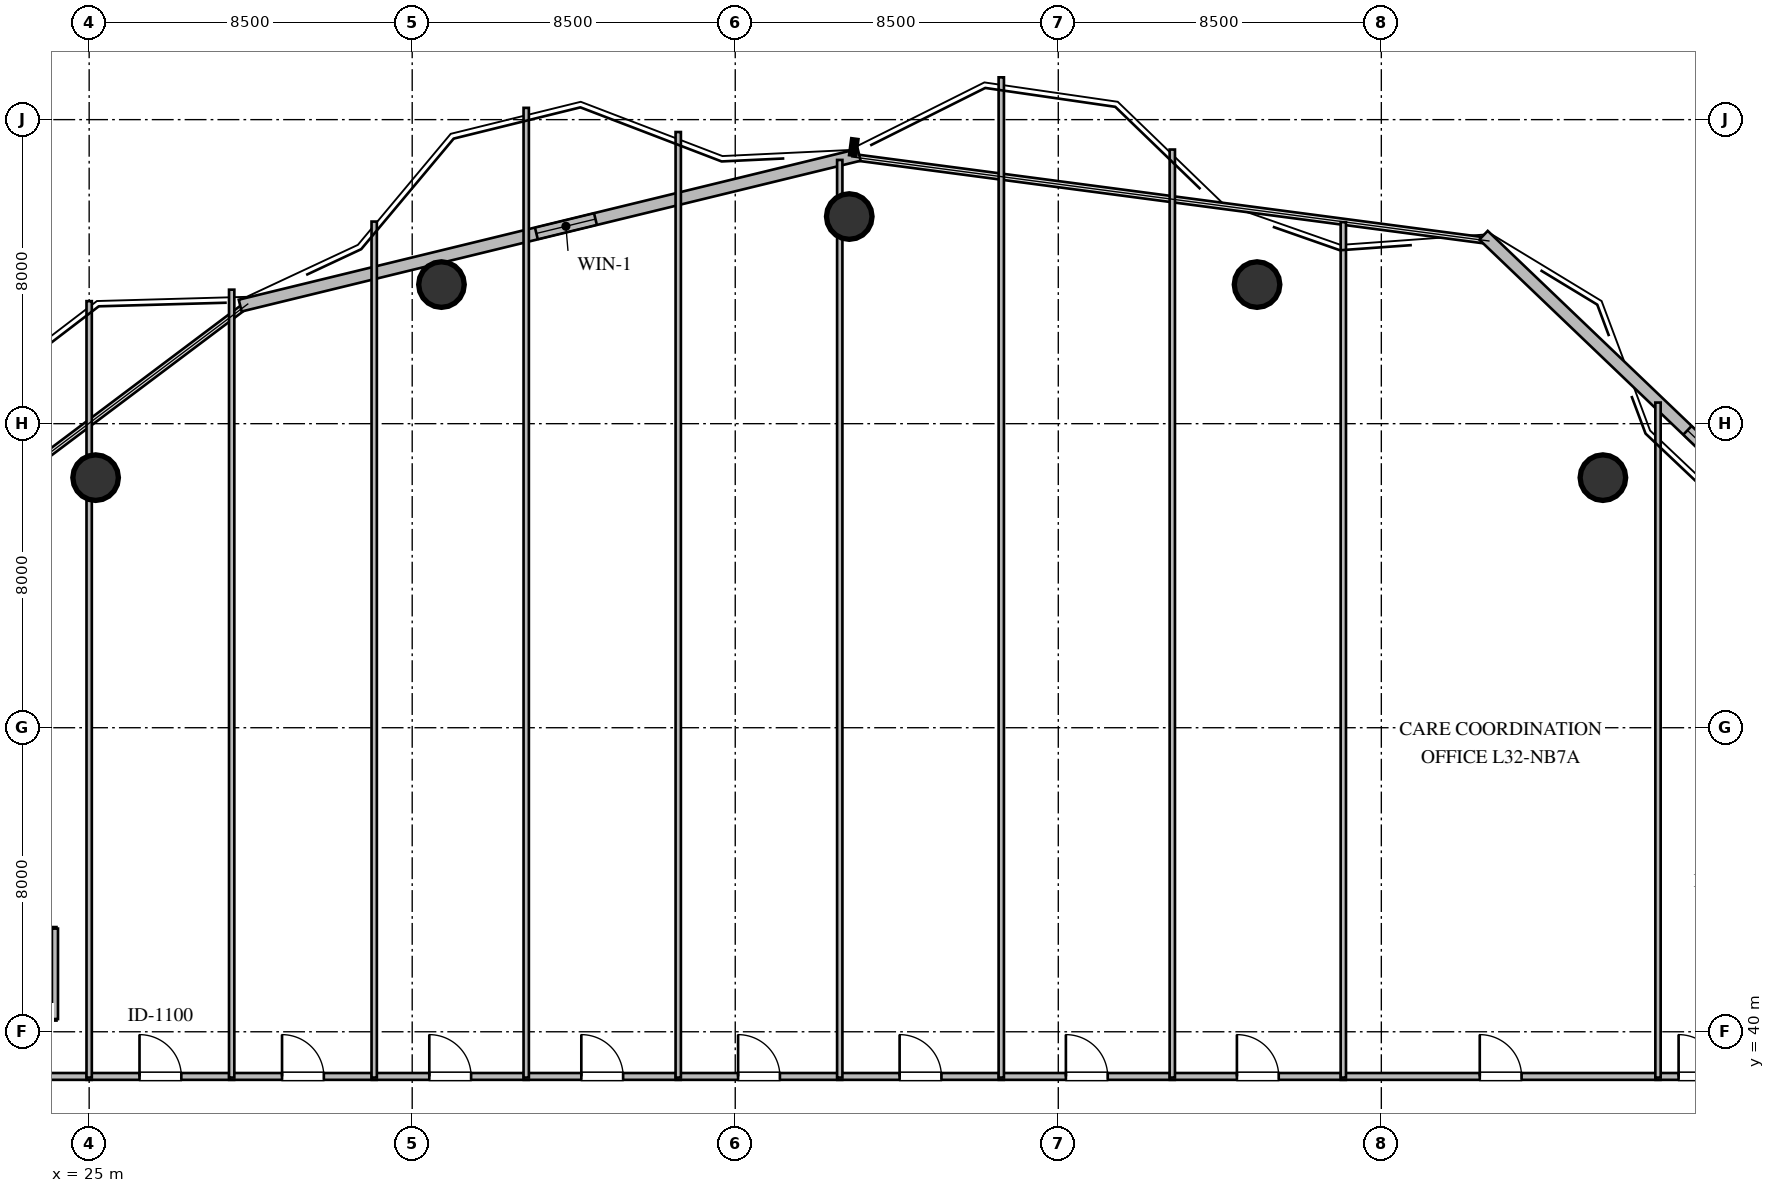
"""IFC4 building model, lengths in metres.
Left out: names, types, materials, properties, quantities, classifications, styles, units other than length and angle.
Written with IfcOpenShell. Run it as: python <this file> out.ifc"""

import sys

from ifc_helpers import new_model, si_unit, direction, frame, frame_2d, origin, origin_2d, place, context, subcontext, project, spatial, rectangle, circle, extrude, element, fill, save


model = new_model("IFC4")
c1 = context("Model", 3, precision=1e-05, world=origin(), true_north=direction((0.0, 1.0)))
c2 = subcontext(c1, "Body", "Model", "MODEL_VIEW")
j1 = project(units=[si_unit("LENGTHUNIT", "METRE"), si_unit("PLANEANGLEUNIT", "RADIAN")], contexts=[c1])
p1 = place(None, origin())
s1 = spatial("IfcSite", under=j1, at=p1, CompositionType="ELEMENT")
p2 = place(p1, origin())
s2 = spatial("IfcBuilding", under=s1, at=p2, CompositionType="ELEMENT")
p3 = place(p2, frame((0.0, 0.0, 124.2)))
s3 = spatial("IfcBuildingStorey", under=s2, at=p3, CompositionType="ELEMENT", Elevation=124.2)
for number, where, z_axis, x_axis in (
    (1, (64.83, 54.58, 0.0), (0.0, 0.0, 1.0), (1.0, 0.0, 0.0)),
    (2, (55.73, 59.66, 0.0), (0.0, 0.0, 1.0), (1.0, 0.0, 0.0)),
    (3, (45.0, 61.45, 0.0), (0.0, 0.0, 1.0), (1.0, 0.0, 0.0)),
    (4, (34.27, 59.66, 0.0), (0.0, 0.0, 1.0), (1.0, 0.0, 0.0)),
    (5, (25.17, 54.58, 0.0), (0.0, 0.0, 1.0), (1.0, 0.0, 0.0)),
):
    element("IfcColumn", number, at=place(p3, frame(where, z_axis=z_axis, x_axis=x_axis)), inside=s3, PredefinedType="COLUMN", context=c2, shape_type="SweptSolid", body=[
        extrude(circle(Radius=0.6, at=origin_2d()), origin(), (0.0, 0.0, 1.0), 3.6),
    ])
p4 = place(p3, frame((28.974, 59.107, 0.0), z_axis=(0.0, 0.0, 1.0), x_axis=(0.971593971582, 0.236654081699, 0.0)))
e6 = element("IfcWall", 6, at=p4, inside=s3, PredefinedType="STANDARD", context=c2, shape_type="SweptSolid", body=[
    extrude(rectangle(XDim=16.763, YDim=0.32, at=frame_2d((8.381, 0.0))), origin(), (0.0, 0.0, 1.0), 3.36),
])
p5 = place(p4, frame((8.021, 0.0, 1.05)))
e7 = element("IfcOpeningElement", 7, at=p5, cuts=e6, PredefinedType="OPENING", context=c2, shape_type="SweptSolid", body=[
    extrude(rectangle(XDim=1.6, YDim=1.5, at=frame_2d((0.8, 0.75))), frame((0.0, 0.17, 0.0), z_axis=(0.0, -1.0, 0.0), x_axis=(1.0, 0.0, 0.0)), (0.0, 0.0, 1.0), 0.34),
])
p6 = place(p3, frame((61.689, 60.957, 0.0), z_axis=(0.0, 0.0, 1.0), x_axis=(0.722641212534, -0.691223319881, 0.0)))
e8 = element("IfcWall", 8, at=p6, inside=s3, PredefinedType="STANDARD", context=c2, shape_type="SweptSolid", body=[
    extrude(rectangle(XDim=16.451, YDim=0.32, at=frame_2d((8.225, 0.0))), origin(), (0.0, 0.0, 1.0), 3.36),
])
p7 = place(p6, frame((7.425, 0.0, 1.05)))
e9 = element("IfcOpeningElement", 9, at=p7, cuts=e8, PredefinedType="OPENING", context=c2, shape_type="SweptSolid", body=[
    extrude(rectangle(XDim=1.6, YDim=1.5, at=frame_2d((0.8, 0.75))), frame((0.0, 0.17, 0.0), z_axis=(0.0, -1.0, 0.0), x_axis=(1.0, 0.0, 0.0)), (0.0, 0.0, 1.0), 0.34),
])
p8 = place(p3, frame((21.76, 40.375, 0.0), z_axis=(0.0, 0.0, 1.0), x_axis=(1.0, 0.0, 0.0)))
e10 = element("IfcWall", 10, at=p8, inside=s3, PredefinedType="PLUMBINGWALL", context=c2, shape_type="SweptSolid", body=[
    extrude(rectangle(XDim=2.38, YDim=0.16, at=frame_2d((1.19, 0.0))), origin(), (0.0, 0.0, 1.0), 3.36),
])
p9 = place(p3, frame((21.76, 42.675, 0.0), z_axis=(0.0, 0.0, 1.0), x_axis=(1.0, 0.0, 0.0)))
e11 = element("IfcWall", 11, at=p9, inside=s3, PredefinedType="PLUMBINGWALL", context=c2, shape_type="SweptSolid", body=[
    extrude(rectangle(XDim=2.38, YDim=0.16, at=frame_2d((1.19, 0.0))), origin(), (0.0, 0.0, 1.0), 3.36),
])
p10 = place(p9, frame((0.74, 0.0, 0.0)))
e12 = element("IfcOpeningElement", 12, at=p10, cuts=e11, PredefinedType="OPENING", context=c2, shape_type="SweptSolid", body=[
    extrude(rectangle(XDim=0.92, YDim=2.1, at=frame_2d((0.46, 1.05))), frame((0.0, 0.09, 0.0), z_axis=(0.0, -1.0, 0.0), x_axis=(1.0, 0.0, 0.0)), (0.0, 0.0, 1.0), 0.18),
])
p11 = place(p3, frame((24.1, 40.335, 0.0), z_axis=(0.0, 0.0, 1.0), x_axis=(0.0, 1.0, 0.0)))
e13 = element("IfcWall", 13, at=p11, inside=s3, PredefinedType="PLUMBINGWALL", context=c2, shape_type="SweptSolid", body=[
    extrude(rectangle(XDim=2.38, YDim=0.16, at=frame_2d((1.19, 0.0))), origin(), (0.0, 0.0, 1.0), 3.36),
])
p12 = place(p3, frame((21.185, 38.825, 0.0), z_axis=(0.0, 0.0, 1.0), x_axis=(1.0, 0.0, 0.0)))
e14 = element("IfcWall", 14, at=p12, inside=s3, PredefinedType="PARTITIONING", context=c2, shape_type="SweptSolid", body=[
    extrude(rectangle(XDim=3.88, YDim=0.18, at=frame_2d((1.94, 0.0))), origin(), (0.0, 0.0, 1.0), 3.36),
])
p13 = place(p12, frame((1.39, 0.0, 0.0)))
e15 = element("IfcOpeningElement", 15, at=p13, cuts=e14, PredefinedType="OPENING", context=c2, shape_type="SweptSolid", body=[
    extrude(rectangle(XDim=1.1, YDim=2.1, at=frame_2d((0.55, 1.05))), frame((0.0, 0.1, 0.0), z_axis=(0.0, -1.0, 0.0), x_axis=(1.0, 0.0, 0.0)), (0.0, 0.0, 1.0), 0.2),
])
p14 = place(p3, frame((24.935, 38.825, 0.0), z_axis=(0.0, 0.0, 1.0), x_axis=(1.0, 0.0, 0.0)))
e16 = element("IfcWall", 16, at=p14, inside=s3, PredefinedType="PARTITIONING", context=c2, shape_type="SweptSolid", body=[
    extrude(rectangle(XDim=3.88, YDim=0.18, at=frame_2d((1.94, 0.0))), origin(), (0.0, 0.0, 1.0), 3.36),
])
p15 = place(p14, frame((1.39, 0.0, 0.0)))
e17 = element("IfcOpeningElement", 17, at=p15, cuts=e16, PredefinedType="OPENING", context=c2, shape_type="SweptSolid", body=[
    extrude(rectangle(XDim=1.1, YDim=2.1, at=frame_2d((0.55, 1.05))), frame((0.0, 0.1, 0.0), z_axis=(0.0, -1.0, 0.0), x_axis=(1.0, 0.0, 0.0)), (0.0, 0.0, 1.0), 0.2),
])
p16 = place(p3, frame((28.685, 38.825, 0.0), z_axis=(0.0, 0.0, 1.0), x_axis=(1.0, 0.0, 0.0)))
e18 = element("IfcWall", 18, at=p16, inside=s3, PredefinedType="PARTITIONING", context=c2, shape_type="SweptSolid", body=[
    extrude(rectangle(XDim=3.88, YDim=0.18, at=frame_2d((1.94, 0.0))), origin(), (0.0, 0.0, 1.0), 3.36),
])
p17 = place(p16, frame((1.39, 0.0, 0.0)))
e19 = element("IfcOpeningElement", 19, at=p17, cuts=e18, PredefinedType="OPENING", context=c2, shape_type="SweptSolid", body=[
    extrude(rectangle(XDim=1.1, YDim=2.1, at=frame_2d((0.55, 1.05))), frame((0.0, 0.1, 0.0), z_axis=(0.0, -1.0, 0.0), x_axis=(1.0, 0.0, 0.0)), (0.0, 0.0, 1.0), 0.2),
])
p18 = place(p3, frame((32.435, 38.825, 0.0), z_axis=(0.0, 0.0, 1.0), x_axis=(1.0, 0.0, 0.0)))
e20 = element("IfcWall", 20, at=p18, inside=s3, PredefinedType="PARTITIONING", context=c2, shape_type="SweptSolid", body=[
    extrude(rectangle(XDim=4.13, YDim=0.18, at=frame_2d((2.065, 0.0))), origin(), (0.0, 0.0, 1.0), 3.36),
])
p19 = place(p18, frame((1.515, 0.0, 0.0)))
e21 = element("IfcOpeningElement", 21, at=p19, cuts=e20, PredefinedType="OPENING", context=c2, shape_type="SweptSolid", body=[
    extrude(rectangle(XDim=1.1, YDim=2.1, at=frame_2d((0.55, 1.05))), frame((0.0, 0.1, 0.0), z_axis=(0.0, -1.0, 0.0), x_axis=(1.0, 0.0, 0.0)), (0.0, 0.0, 1.0), 0.2),
])
p20 = place(p3, frame((36.435, 38.825, 0.0), z_axis=(0.0, 0.0, 1.0), x_axis=(1.0, 0.0, 0.0)))
e22 = element("IfcWall", 22, at=p20, inside=s3, PredefinedType="PARTITIONING", context=c2, shape_type="SweptSolid", body=[
    extrude(rectangle(XDim=4.13, YDim=0.18, at=frame_2d((2.065, 0.0))), origin(), (0.0, 0.0, 1.0), 3.36),
])
p21 = place(p20, frame((1.515, 0.0, 0.0)))
e23 = element("IfcOpeningElement", 23, at=p21, cuts=e22, PredefinedType="OPENING", context=c2, shape_type="SweptSolid", body=[
    extrude(rectangle(XDim=1.1, YDim=2.1, at=frame_2d((0.55, 1.05))), frame((0.0, 0.1, 0.0), z_axis=(0.0, -1.0, 0.0), x_axis=(1.0, 0.0, 0.0)), (0.0, 0.0, 1.0), 0.2),
])
p22 = place(p3, frame((40.435, 38.825, 0.0), z_axis=(0.0, 0.0, 1.0), x_axis=(1.0, 0.0, 0.0)))
e24 = element("IfcWall", 24, at=p22, inside=s3, PredefinedType="PARTITIONING", context=c2, shape_type="SweptSolid", body=[
    extrude(rectangle(XDim=4.38, YDim=0.18, at=frame_2d((2.19, 0.0))), origin(), (0.0, 0.0, 1.0), 3.36),
])
p23 = place(p22, frame((1.64, 0.0, 0.0)))
e25 = element("IfcOpeningElement", 25, at=p23, cuts=e24, PredefinedType="OPENING", context=c2, shape_type="SweptSolid", body=[
    extrude(rectangle(XDim=1.1, YDim=2.1, at=frame_2d((0.55, 1.05))), frame((0.0, 0.1, 0.0), z_axis=(0.0, -1.0, 0.0), x_axis=(1.0, 0.0, 0.0)), (0.0, 0.0, 1.0), 0.2),
])
p24 = place(p3, frame((44.685, 38.825, 0.0), z_axis=(0.0, 0.0, 1.0), x_axis=(1.0, 0.0, 0.0)))
e26 = element("IfcWall", 26, at=p24, inside=s3, PredefinedType="PARTITIONING", context=c2, shape_type="SweptSolid", body=[
    extrude(rectangle(XDim=4.38, YDim=0.18, at=frame_2d((2.19, 0.0))), origin(), (0.0, 0.0, 1.0), 3.36),
])
p25 = place(p24, frame((1.64, 0.0, 0.0)))
e27 = element("IfcOpeningElement", 27, at=p25, cuts=e26, PredefinedType="OPENING", context=c2, shape_type="SweptSolid", body=[
    extrude(rectangle(XDim=1.1, YDim=2.1, at=frame_2d((0.55, 1.05))), frame((0.0, 0.1, 0.0), z_axis=(0.0, -1.0, 0.0), x_axis=(1.0, 0.0, 0.0)), (0.0, 0.0, 1.0), 0.2),
])
p26 = place(p3, frame((48.935, 38.825, 0.0), z_axis=(0.0, 0.0, 1.0), x_axis=(1.0, 0.0, 0.0)))
e28 = element("IfcWall", 28, at=p26, inside=s3, PredefinedType="PARTITIONING", context=c2, shape_type="SweptSolid", body=[
    extrude(rectangle(XDim=4.63, YDim=0.18, at=frame_2d((2.315, 0.0))), origin(), (0.0, 0.0, 1.0), 3.36),
])
p27 = place(p26, frame((1.765, 0.0, 0.0)))
e29 = element("IfcOpeningElement", 29, at=p27, cuts=e28, PredefinedType="OPENING", context=c2, shape_type="SweptSolid", body=[
    extrude(rectangle(XDim=1.1, YDim=2.1, at=frame_2d((0.55, 1.05))), frame((0.0, 0.1, 0.0), z_axis=(0.0, -1.0, 0.0), x_axis=(1.0, 0.0, 0.0)), (0.0, 0.0, 1.0), 0.2),
])
p28 = place(p3, frame((53.435, 38.825, 0.0), z_axis=(0.0, 0.0, 1.0), x_axis=(1.0, 0.0, 0.0)))
e30 = element("IfcWall", 30, at=p28, inside=s3, PredefinedType="PARTITIONING", context=c2, shape_type="SweptSolid", body=[
    extrude(rectangle(XDim=4.63, YDim=0.18, at=frame_2d((2.315, 0.0))), origin(), (0.0, 0.0, 1.0), 3.36),
])
p29 = place(p28, frame((1.765, 0.0, 0.0)))
e31 = element("IfcOpeningElement", 31, at=p29, cuts=e30, PredefinedType="OPENING", context=c2, shape_type="SweptSolid", body=[
    extrude(rectangle(XDim=1.1, YDim=2.1, at=frame_2d((0.55, 1.05))), frame((0.0, 0.1, 0.0), z_axis=(0.0, -1.0, 0.0), x_axis=(1.0, 0.0, 0.0)), (0.0, 0.0, 1.0), 0.2),
])
p30 = place(p3, frame((57.935, 38.825, 0.0), z_axis=(0.0, 0.0, 1.0), x_axis=(1.0, 0.0, 0.0)))
e32 = element("IfcWall", 32, at=p30, inside=s3, PredefinedType="PARTITIONING", context=c2, shape_type="SweptSolid", body=[
    extrude(rectangle(XDim=8.41, YDim=0.18, at=frame_2d((4.205, 0.0))), origin(), (0.0, 0.0, 1.0), 3.36),
])
p31 = place(p30, frame((3.655, 0.0, 0.0)))
e33 = element("IfcOpeningElement", 33, at=p31, cuts=e32, PredefinedType="OPENING", context=c2, shape_type="SweptSolid", body=[
    extrude(rectangle(XDim=1.1, YDim=2.1, at=frame_2d((0.55, 1.05))), frame((0.0, 0.1, 0.0), z_axis=(0.0, -1.0, 0.0), x_axis=(1.0, 0.0, 0.0)), (0.0, 0.0, 1.0), 0.2),
])
p32 = place(p3, frame((66.215, 38.825, 0.0), z_axis=(0.0, 0.0, 1.0), x_axis=(1.0, 0.0, 0.0)))
e34 = element("IfcWall", 34, at=p32, inside=s3, PredefinedType="PARTITIONING", context=c2, shape_type="SweptSolid", body=[
    extrude(rectangle(XDim=2.315, YDim=0.18, at=frame_2d((1.157, 0.0))), origin(), (0.0, 0.0, 1.0), 3.36),
])
p33 = place(p32, frame((0.607, 0.0, 0.0)))
e35 = element("IfcOpeningElement", 35, at=p33, cuts=e34, PredefinedType="OPENING", context=c2, shape_type="SweptSolid", body=[
    extrude(rectangle(XDim=1.1, YDim=2.1, at=frame_2d((0.55, 1.05))), frame((0.0, 0.1, 0.0), z_axis=(0.0, -1.0, 0.0), x_axis=(1.0, 0.0, 0.0)), (0.0, 0.0, 1.0), 0.2),
])
p34 = place(p3, frame((25.0, 59.224, 0.0), z_axis=(0.0, 0.0, 1.0), x_axis=(0.0, -1.0, 0.0)))
e36 = element("IfcWall", 36, at=p34, inside=s3, PredefinedType="PARTITIONING", context=c2, shape_type="SweptSolid", body=[
    extrude(rectangle(XDim=20.429, YDim=0.14, at=frame_2d((10.215, 0.0))), origin(), (0.0, 0.0, 1.0), 2.806),
])
p35 = place(p3, frame((28.75, 59.526, 0.0), z_axis=(0.0, 0.0, 1.0), x_axis=(0.0, -1.0, 0.0)))
e37 = element("IfcWall", 37, at=p35, inside=s3, PredefinedType="PARTITIONING", context=c2, shape_type="SweptSolid", body=[
    extrude(rectangle(XDim=20.731, YDim=0.14, at=frame_2d((10.365, 0.0))), origin(), (0.0, 0.0, 1.0), 3.36),
])
p36 = place(p3, frame((32.5, 61.318, 0.0), z_axis=(0.0, 0.0, 1.0), x_axis=(0.0, -1.0, 0.0)))
e38 = element("IfcWall", 38, at=p36, inside=s3, PredefinedType="PARTITIONING", context=c2, shape_type="SweptSolid", body=[
    extrude(rectangle(XDim=22.523, YDim=0.14, at=frame_2d((11.262, 0.0))), origin(), (0.0, 0.0, 1.0), 3.36),
])
p37 = place(p3, frame((36.5, 64.31, 0.0), z_axis=(0.0, 0.0, 1.0), x_axis=(0.0, -1.0, 0.0)))
e39 = element("IfcWall", 39, at=p37, inside=s3, PredefinedType="PARTITIONING", context=c2, shape_type="SweptSolid", body=[
    extrude(rectangle(XDim=25.515, YDim=0.14, at=frame_2d((12.758, 0.0))), origin(), (0.0, 0.0, 1.0), 3.36),
])
p38 = place(p3, frame((40.5, 63.674, 0.0), z_axis=(0.0, 0.0, 1.0), x_axis=(0.0, -1.0, 0.0)))
e40 = element("IfcWall", 40, at=p38, inside=s3, PredefinedType="PARTITIONING", context=c2, shape_type="SweptSolid", body=[
    extrude(rectangle(XDim=24.879, YDim=0.14, at=frame_2d((12.439, 0.0))), origin(), (0.0, 0.0, 1.0), 3.36),
])
p39 = place(p3, frame((44.75, 62.939, 0.0), z_axis=(0.0, 0.0, 1.0), x_axis=(0.0, -1.0, 0.0)))
e41 = element("IfcWall", 41, at=p39, inside=s3, PredefinedType="PARTITIONING", context=c2, shape_type="SweptSolid", body=[
    extrude(rectangle(XDim=24.145, YDim=0.14, at=frame_2d((12.072, 0.0))), origin(), (0.0, 0.0, 1.0), 2.806),
])
p40 = place(p3, frame((49.0, 65.113, 0.0), z_axis=(0.0, 0.0, 1.0), x_axis=(0.0, -1.0, 0.0)))
e42 = element("IfcWall", 42, at=p40, inside=s3, PredefinedType="PARTITIONING", context=c2, shape_type="SweptSolid", body=[
    extrude(rectangle(XDim=26.318, YDim=0.14, at=frame_2d((13.159, 0.0))), origin(), (0.0, 0.0, 1.0), 3.36),
])
p41 = place(p3, frame((53.5, 63.213, 0.0), z_axis=(0.0, 0.0, 1.0), x_axis=(0.0, -1.0, 0.0)))
e43 = element("IfcWall", 43, at=p41, inside=s3, PredefinedType="PARTITIONING", context=c2, shape_type="SweptSolid", body=[
    extrude(rectangle(XDim=24.418, YDim=0.14, at=frame_2d((12.209, 0.0))), origin(), (0.0, 0.0, 1.0), 3.36),
])
p42 = place(p3, frame((58.0, 61.303, 0.0), z_axis=(0.0, 0.0, 1.0), x_axis=(0.0, -1.0, 0.0)))
e44 = element("IfcWall", 44, at=p42, inside=s3, PredefinedType="PARTITIONING", context=c2, shape_type="SweptSolid", body=[
    extrude(rectangle(XDim=22.508, YDim=0.14, at=frame_2d((11.254, 0.0))), origin(), (0.0, 0.0, 1.0), 3.36),
])
p43 = place(p3, frame((66.28, 56.556, 0.0), z_axis=(0.0, 0.0, 1.0), x_axis=(0.0, -1.0, 0.0)))
e45 = element("IfcWall", 45, at=p43, inside=s3, PredefinedType="PARTITIONING", context=c2, shape_type="SweptSolid", body=[
    extrude(rectangle(XDim=17.761, YDim=0.14, at=frame_2d((8.88, 0.0))), origin(), (0.0, 0.0, 1.0), 3.36),
])
p44 = place(p5, origin())
e46 = element("IfcWindow", 46, at=p44, inside=s3, PartitioningType="SINGLE_PANEL", PredefinedType="WINDOW", context=c2, shape_type="SweptSolid", body=[
    extrude(rectangle(XDim=1.6, YDim=1.5, at=frame_2d((0.8, 0.75))), frame((0.0, 0.03, 0.0), z_axis=(0.0, -1.0, 0.0), x_axis=(1.0, 0.0, 0.0)), (0.0, 0.0, 1.0), 0.06),
])
fill(e7, e46)
p45 = place(p7, origin())
e47 = element("IfcWindow", 47, at=p45, inside=s3, PartitioningType="SINGLE_PANEL", PredefinedType="WINDOW", context=c2, shape_type="SweptSolid", body=[
    extrude(rectangle(XDim=1.6, YDim=1.5, at=frame_2d((0.8, 0.75))), frame((0.0, 0.03, 0.0), z_axis=(0.0, -1.0, 0.0), x_axis=(1.0, 0.0, 0.0)), (0.0, 0.0, 1.0), 0.06),
])
fill(e9, e47)
p46 = place(p15, origin())
e48 = element("IfcDoor", 48, at=p46, inside=s3, OperationType="SINGLE_SWING_LEFT", PredefinedType="DOOR", context=c2, shape_type="SweptSolid", body=[
    extrude(rectangle(XDim=1.1, YDim=2.1, at=frame_2d((0.55, 1.05))), frame((0.0, 0.025, 0.0), z_axis=(0.0, -1.0, 0.0), x_axis=(1.0, 0.0, 0.0)), (0.0, 0.0, 1.0), 0.05),
])
fill(e17, e48)
p47 = place(p17, origin())
e49 = element("IfcDoor", 49, at=p47, inside=s3, OperationType="SINGLE_SWING_LEFT", PredefinedType="DOOR", context=c2, shape_type="SweptSolid", body=[
    extrude(rectangle(XDim=1.1, YDim=2.1, at=frame_2d((0.55, 1.05))), frame((0.0, 0.025, 0.0), z_axis=(0.0, -1.0, 0.0), x_axis=(1.0, 0.0, 0.0)), (0.0, 0.0, 1.0), 0.05),
])
fill(e19, e49)
p48 = place(p19, origin())
e50 = element("IfcDoor", 50, at=p48, inside=s3, OperationType="SINGLE_SWING_LEFT", PredefinedType="DOOR", context=c2, shape_type="SweptSolid", body=[
    extrude(rectangle(XDim=1.1, YDim=2.1, at=frame_2d((0.55, 1.05))), frame((0.0, 0.025, 0.0), z_axis=(0.0, -1.0, 0.0), x_axis=(1.0, 0.0, 0.0)), (0.0, 0.0, 1.0), 0.05),
])
fill(e21, e50)
p49 = place(p21, origin())
e51 = element("IfcDoor", 51, at=p49, inside=s3, OperationType="SINGLE_SWING_LEFT", PredefinedType="DOOR", context=c2, shape_type="SweptSolid", body=[
    extrude(rectangle(XDim=1.1, YDim=2.1, at=frame_2d((0.55, 1.05))), frame((0.0, 0.025, 0.0), z_axis=(0.0, -1.0, 0.0), x_axis=(1.0, 0.0, 0.0)), (0.0, 0.0, 1.0), 0.05),
])
fill(e23, e51)
p50 = place(p23, origin())
e52 = element("IfcDoor", 52, at=p50, inside=s3, OperationType="SINGLE_SWING_LEFT", PredefinedType="DOOR", context=c2, shape_type="SweptSolid", body=[
    extrude(rectangle(XDim=1.1, YDim=2.1, at=frame_2d((0.55, 1.05))), frame((0.0, 0.025, 0.0), z_axis=(0.0, -1.0, 0.0), x_axis=(1.0, 0.0, 0.0)), (0.0, 0.0, 1.0), 0.05),
])
fill(e25, e52)
p51 = place(p25, origin())
e53 = element("IfcDoor", 53, at=p51, inside=s3, OperationType="SINGLE_SWING_LEFT", PredefinedType="DOOR", context=c2, shape_type="SweptSolid", body=[
    extrude(rectangle(XDim=1.1, YDim=2.1, at=frame_2d((0.55, 1.05))), frame((0.0, 0.025, 0.0), z_axis=(0.0, -1.0, 0.0), x_axis=(1.0, 0.0, 0.0)), (0.0, 0.0, 1.0), 0.05),
])
fill(e27, e53)
p52 = place(p27, origin())
e54 = element("IfcDoor", 54, at=p52, inside=s3, OperationType="SINGLE_SWING_LEFT", PredefinedType="DOOR", context=c2, shape_type="SweptSolid", body=[
    extrude(rectangle(XDim=1.1, YDim=2.1, at=frame_2d((0.55, 1.05))), frame((0.0, 0.025, 0.0), z_axis=(0.0, -1.0, 0.0), x_axis=(1.0, 0.0, 0.0)), (0.0, 0.0, 1.0), 0.05),
])
fill(e29, e54)
p53 = place(p29, origin())
e55 = element("IfcDoor", 55, at=p53, inside=s3, OperationType="SINGLE_SWING_LEFT", PredefinedType="DOOR", context=c2, shape_type="SweptSolid", body=[
    extrude(rectangle(XDim=1.1, YDim=2.1, at=frame_2d((0.55, 1.05))), frame((0.0, 0.025, 0.0), z_axis=(0.0, -1.0, 0.0), x_axis=(1.0, 0.0, 0.0)), (0.0, 0.0, 1.0), 0.05),
])
fill(e31, e55)
p54 = place(p31, origin())
e56 = element("IfcDoor", 56, at=p54, inside=s3, OperationType="SINGLE_SWING_LEFT", PredefinedType="DOOR", context=c2, shape_type="SweptSolid", body=[
    extrude(rectangle(XDim=1.1, YDim=2.1, at=frame_2d((0.55, 1.05))), frame((0.0, 0.025, 0.0), z_axis=(0.0, -1.0, 0.0), x_axis=(1.0, 0.0, 0.0)), (0.0, 0.0, 1.0), 0.05),
])
fill(e33, e56)
p55 = place(p33, origin())
e57 = element("IfcDoor", 57, at=p55, inside=s3, OperationType="SINGLE_SWING_LEFT", PredefinedType="DOOR", context=c2, shape_type="SweptSolid", body=[
    extrude(rectangle(XDim=1.1, YDim=2.1, at=frame_2d((0.55, 1.05))), frame((0.0, 0.025, 0.0), z_axis=(0.0, -1.0, 0.0), x_axis=(1.0, 0.0, 0.0)), (0.0, 0.0, 1.0), 0.05),
])
fill(e35, e57)
save(model, sys.argv[1])
